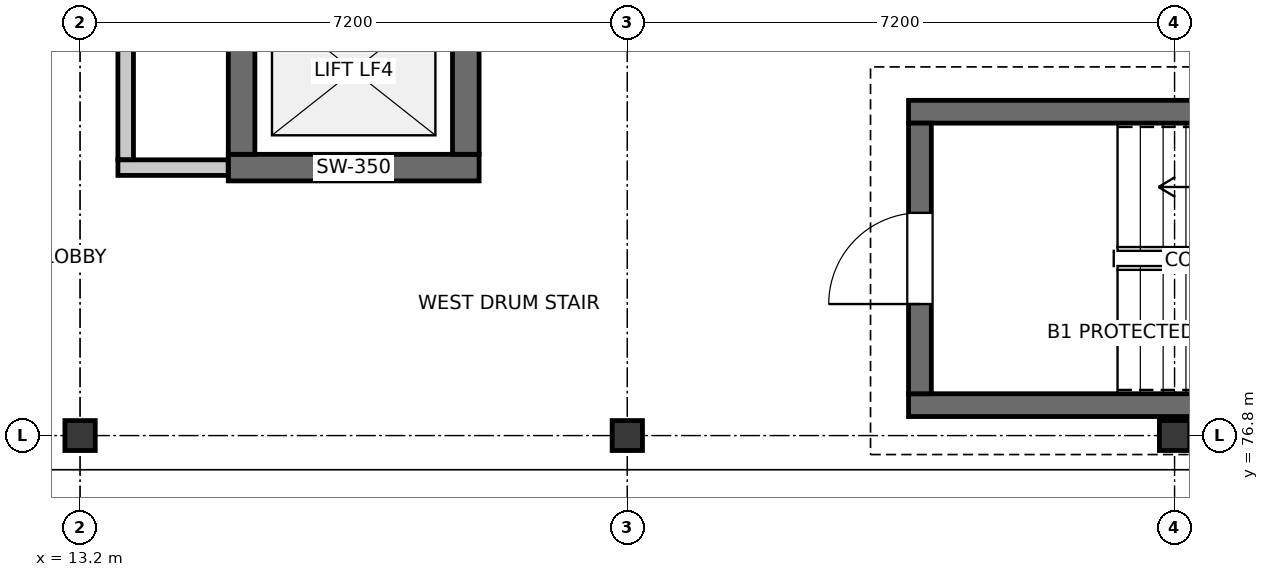
"""IFC4 building model, lengths in metres.
Left out: names, types, materials, properties, quantities, classifications, styles, units other than length and angle.
Written with IfcOpenShell. Run it as: python <this file> out.ifc"""

import sys

from ifc_helpers import new_model, si_unit, direction, frame, frame_2d, origin, origin_2d, place, context, subcontext, project, spatial, rectangle, i_section, extrude, element, fill, save


model = new_model("IFC4")
c1 = context("Model", 3, precision=1e-05, world=origin(), true_north=direction((0.0, 1.0)))
c2 = subcontext(c1, "Body", "Model", "MODEL_VIEW")
j1 = project(units=[si_unit("LENGTHUNIT", "METRE"), si_unit("PLANEANGLEUNIT", "RADIAN")], contexts=[c1])
p1 = place(None, origin())
s1 = spatial("IfcSite", under=j1, at=p1, CompositionType="ELEMENT")
p2 = place(p1, origin())
s2 = spatial("IfcBuilding", under=s1, at=p2, CompositionType="ELEMENT")
p3 = place(p2, frame((0.0, 0.0, -4.5)))
s3 = spatial("IfcBuildingStorey", under=s2, at=p3, CompositionType="ELEMENT", Elevation=-4.5)
for number, where, z_axis, x_axis in (
    (1, (13.2, 76.8, 0.0), (0.0, 0.0, 1.0), (1.0, 0.0, 0.0)),
    (2, (20.4, 76.8, 0.0), (0.0, 0.0, 1.0), (1.0, 0.0, 0.0)),
    (3, (27.6, 76.8, 0.0), (0.0, 0.0, 1.0), (1.0, 0.0, 0.0)),
):
    element("IfcColumn", number, at=place(p3, frame(where, z_axis=z_axis, x_axis=x_axis)), inside=s3, PredefinedType="COLUMN", context=c2, shape_type="SweptSolid", body=[
        extrude(i_section(OverallWidth=0.399, OverallDepth=0.394, WebThickness=0.023, FlangeThickness=0.037, FilletRadius=0.015, at=origin_2d()), origin(), (0.0, 0.0, 1.0), 4.5),
    ])
for number, where, z_axis, x_axis in (
    (4, (33.5, 77.2, 0.0), (0.0, 0.0, 1.0), (-1.0, 0.0, 0.0)),
    (5, (24.1, 81.06, 0.0), (0.0, 0.0, 1.0), (1.0, 0.0, 0.0)),
):
    element("IfcWall", number, at=place(p3, frame(where, z_axis=z_axis, x_axis=x_axis)), inside=s3, PredefinedType="SOLIDWALL", context=c2, shape_type="SweptSolid", body=[
        extrude(rectangle(XDim=9.4, YDim=0.3, at=frame_2d((4.7, 0.0))), origin(), (0.0, 0.0, 1.0), 4.25),
    ])
p4 = place(p3, frame((24.25, 77.35, 0.0), z_axis=(0.0, 0.0, 1.0), x_axis=(0.0, 1.0, 0.0)))
e6 = element("IfcWall", 6, at=p4, inside=s3, PredefinedType="SOLIDWALL", context=c2, shape_type="SweptSolid", body=[
    extrude(rectangle(XDim=3.56, YDim=0.3, at=frame_2d((1.78, 0.0))), origin(), (0.0, 0.0, 1.0), 4.25),
])
p5 = place(p4, frame((1.18, 0.0, 0.0)))
e7 = element("IfcOpeningElement", 7, at=p5, cuts=e6, PredefinedType="OPENING", context=c2, shape_type="SweptSolid", body=[
    extrude(rectangle(XDim=1.2, YDim=2.2, at=frame_2d((0.6, 1.1))), frame((0.0, 0.16, 0.0), z_axis=(0.0, -1.0, 0.0), x_axis=(1.0, 0.0, 0.0)), (0.0, 0.0, 1.0), 0.32),
])
p6 = place(p3, frame((18.45, 80.325, 0.0), z_axis=(0.0, 0.0, 1.0), x_axis=(-1.0, 0.0, 0.0)))
e8 = element("IfcWall", 8, at=p6, inside=s3, PredefinedType="SHEAR", context=c2, shape_type="SweptSolid", body=[
    extrude(rectangle(XDim=3.3, YDim=0.35, at=frame_2d((1.65, 0.0))), origin(), (0.0, 0.0, 1.0), 4.25),
])
for number, where, z_axis, x_axis in (
    (9, (15.325, 80.5, 0.0), (0.0, 0.0, 1.0), (0.0, 1.0, 0.0)),
    (10, (18.275, 82.7, 0.0), (0.0, 0.0, 1.0), (0.0, -1.0, 0.0)),
):
    element("IfcWall", number, at=place(p3, frame(where, z_axis=z_axis, x_axis=x_axis)), inside=s3, PredefinedType="SHEAR", context=c2, shape_type="SweptSolid", body=[
        extrude(rectangle(XDim=2.2, YDim=0.35, at=frame_2d((1.1, 0.0))), origin(), (0.0, 0.0, 1.0), 4.25),
    ])
p7 = place(p3, frame((15.148, 80.325, 0.0), z_axis=(0.0, 0.0, 1.0), x_axis=(-1.0, 0.0, 0.0)))
e11 = element("IfcWall", 11, at=p7, inside=s3, PredefinedType="PARTITIONING", context=c2, shape_type="SweptSolid", body=[
    extrude(rectangle(XDim=1.45, YDim=0.205, at=frame_2d((0.725, 0.0))), origin(), (0.0, 0.0, 1.0), 3.618),
])
p8 = place(p3, frame((13.8, 80.43, 0.0), z_axis=(0.0, 0.0, 1.0), x_axis=(0.0, 1.0, 0.0)))
e12 = element("IfcWall", 12, at=p8, inside=s3, PredefinedType="PARTITIONING", context=c2, shape_type="SweptSolid", body=[
    extrude(rectangle(XDim=4.516, YDim=0.205, at=frame_2d((2.258, 0.0))), origin(), (0.0, 0.0, 1.0), 3.618),
])
p9 = place(p8, frame((1.788, 0.0, 0.0)))
e13 = element("IfcOpeningElement", 13, at=p9, cuts=e12, PredefinedType="OPENING", context=c2, shape_type="SweptSolid", body=[
    extrude(rectangle(XDim=0.94, YDim=2.1, at=frame_2d((0.47, 1.05))), frame((0.0, 0.113, 0.0), z_axis=(0.0, -1.0, 0.0), x_axis=(1.0, 0.0, 0.0)), (0.0, 0.0, 1.0), 0.225),
])
p10 = place(p5, origin())
e14 = element("IfcDoor", 14, at=p10, inside=s3, OperationType="SINGLE_SWING_LEFT", PredefinedType="DOOR", context=c2, shape_type="SweptSolid", body=[
    extrude(rectangle(XDim=1.2, YDim=2.2, at=frame_2d((0.6, 1.1))), frame((0.0, 0.025, 0.0), z_axis=(0.0, -1.0, 0.0), x_axis=(1.0, 0.0, 0.0)), (0.0, 0.0, 1.0), 0.05),
])
fill(e7, e14)
save(model, sys.argv[1])
